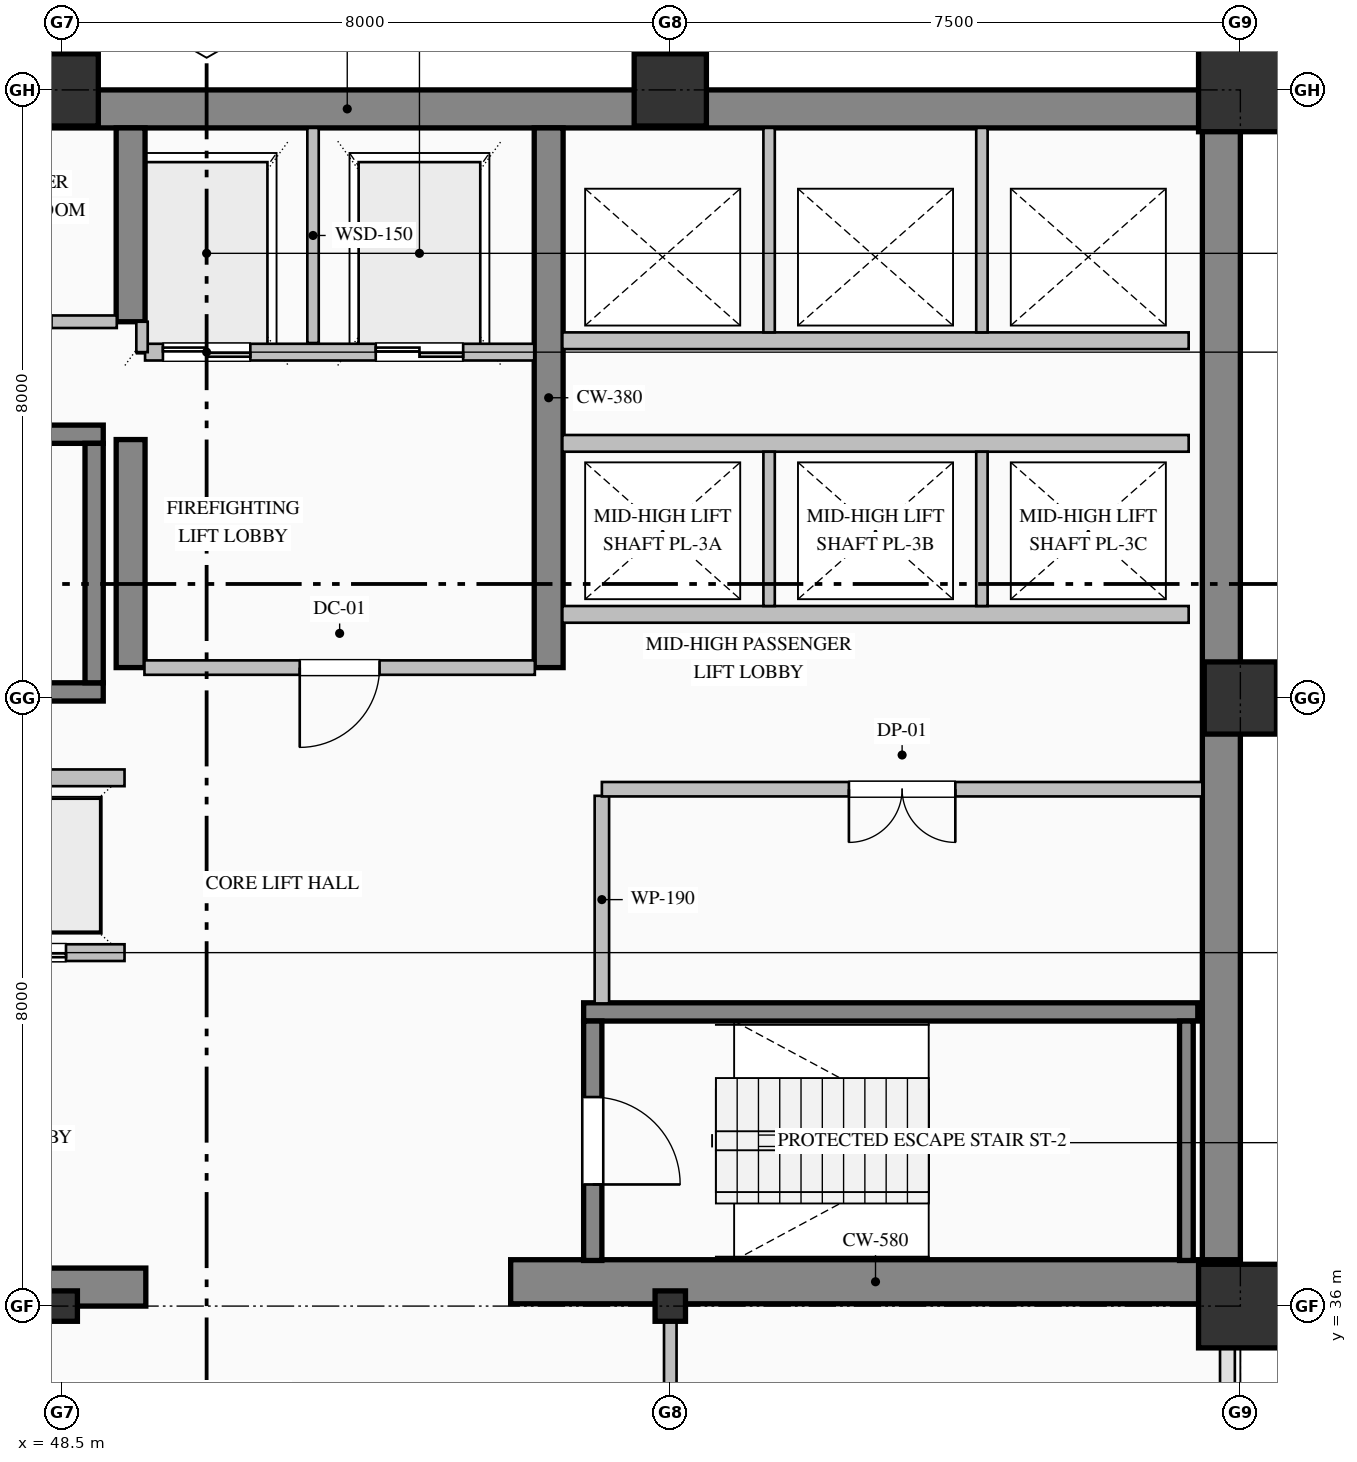
"""IFC4 building model, lengths in metres.
Left out: names, types, materials, properties, quantities, classifications, styles, units other than length and angle.
Written with IfcOpenShell. Run it as: python <this file> out.ifc"""

import sys

from ifc_helpers import new_model, si_unit, direction, frame, frame_2d, origin, origin_2d, place, context, subcontext, project, spatial, rectangle, hollow_rectangle, i_section, extrude, element, fill, save


model = new_model("IFC4")
c1 = context("Model", 3, precision=1e-05, world=origin(), true_north=direction((0.0, 1.0)))
c2 = subcontext(c1, "Body", "Model", "MODEL_VIEW")
j1 = project(units=[si_unit("LENGTHUNIT", "METRE"), si_unit("PLANEANGLEUNIT", "RADIAN")], contexts=[c1])
p1 = place(None, origin())
s1 = spatial("IfcSite", under=j1, at=p1, CompositionType="ELEMENT")
p2 = place(p1, origin())
s2 = spatial("IfcBuilding", under=s1, at=p2, CompositionType="ELEMENT")
p3 = place(p2, frame((0.0, 0.0, 123.0)))
s3 = spatial("IfcBuildingStorey", under=s2, at=p3, CompositionType="ELEMENT", Elevation=123.0)
p4 = place(p3, frame((40.5, 51.75, 0.0), z_axis=(0.0, 0.0, 1.0), x_axis=(1.0, 0.0, 0.0)))
e1 = element("IfcWall", 1, at=p4, inside=s3, PredefinedType="SHEAR", context=c2, shape_type="SweptSolid", body=[
    extrude(rectangle(XDim=23.5, YDim=0.5, at=frame_2d((11.75, 0.0))), origin(), (0.0, 0.0, 1.0), 3.765),
])
p5 = place(p3, frame((63.75, 36.32, 0.0), z_axis=(0.0, 0.0, 1.0), x_axis=(0.0, 1.0, 0.0)))
e2 = element("IfcWall", 2, at=p5, inside=s3, PredefinedType="SHEAR", context=c2, shape_type="SweptSolid", body=[
    extrude(rectangle(XDim=15.18, YDim=0.5, at=frame_2d((7.59, 0.0))), origin(), (0.0, 0.0, 1.0), 3.765),
])
p6 = place(p3, frame((40.5, 36.25, 0.0), z_axis=(0.0, 0.0, 1.0), x_axis=(1.0, 0.0, 0.0)))
e3 = element("IfcWall", 3, at=p6, inside=s3, PredefinedType="SHEAR", context=c2, shape_type="SweptSolid", body=[
    extrude(rectangle(XDim=9.1, YDim=0.5, at=frame_2d((4.55, 0.0))), origin(), (0.0, 0.0, 1.0), 3.765),
])
p7 = place(p3, frame((54.4, 36.32, 0.0), z_axis=(0.0, 0.0, 1.0), x_axis=(1.0, 0.0, 0.0)))
e4 = element("IfcWall", 4, at=p7, inside=s3, PredefinedType="SHEAR", context=c2, shape_type="SweptSolid", body=[
    extrude(rectangle(XDim=9.6, YDim=0.58, at=frame_2d((4.8, 0.0))), origin(), (0.0, 0.0, 1.0), 4.0),
])
p8 = place(p3, frame((49.4, 44.4, 0.0), z_axis=(0.0, 0.0, 1.0), x_axis=(0.0, 1.0, 0.0)))
e5 = element("IfcWall", 5, at=p8, inside=s3, PredefinedType="SHEAR", context=c2, shape_type="SweptSolid", body=[
    extrude(rectangle(XDim=3.0, YDim=0.38, at=frame_2d((1.5, 0.0))), origin(), (0.0, 0.0, 1.0), 3.765),
])
p9 = place(p3, frame((49.4, 48.95, 0.0), z_axis=(0.0, 0.0, 1.0), x_axis=(0.0, 1.0, 0.0)))
e6 = element("IfcWall", 6, at=p9, inside=s3, PredefinedType="SHEAR", context=c2, shape_type="SweptSolid", body=[
    extrude(rectangle(XDim=2.55, YDim=0.38, at=frame_2d((1.275, 0.0))), origin(), (0.0, 0.0, 1.0), 3.765),
])
p10 = place(p3, frame((54.9, 44.4, 0.0), z_axis=(0.0, 0.0, 1.0), x_axis=(0.0, 1.0, 0.0)))
e7 = element("IfcWall", 7, at=p10, inside=s3, PredefinedType="SHEAR", context=c2, shape_type="SweptSolid", body=[
    extrude(rectangle(XDim=7.1, YDim=0.38, at=frame_2d((3.55, 0.0))), origin(), (0.0, 0.0, 1.0), 3.765),
])
p11 = place(p3, frame((48.5, 36.0, 0.0), z_axis=(0.0, 0.0, 1.0), x_axis=(1.0, 0.0, 0.0)))
e8 = element("IfcColumn", 8, at=p11, inside=s3, PredefinedType="COLUMN", context=c2, shape_type="SweptSolid", body=[
    extrude(i_section(OverallWidth=0.4, OverallDepth=0.4, WebThickness=0.013, FlangeThickness=0.021, FilletRadius=0.022, at=origin_2d()), origin(), (0.0, 0.0, 1.0), 4.0),
])
p12 = place(p3, frame((48.5, 52.0, 0.0), z_axis=(0.0, 0.0, 1.0), x_axis=(1.0, 0.0, 0.0)))
e9 = element("IfcColumn", 9, at=p12, inside=s3, PredefinedType="COLUMN", context=c2, shape_type="SweptSolid", body=[
    extrude(hollow_rectangle(XDim=0.95, YDim=0.95, WallThickness=0.036, at=origin_2d()), origin(), (0.0, 0.0, 1.0), 4.0),
])
p13 = place(p3, frame((56.5, 36.0, 0.0), z_axis=(0.0, 0.0, 1.0), x_axis=(1.0, 0.0, 0.0)))
e10 = element("IfcColumn", 10, at=p13, inside=s3, PredefinedType="COLUMN", context=c2, shape_type="SweptSolid", body=[
    extrude(i_section(OverallWidth=0.4, OverallDepth=0.4, WebThickness=0.013, FlangeThickness=0.021, FilletRadius=0.022, at=origin_2d()), origin(), (0.0, 0.0, 1.0), 4.0),
])
p14 = place(p3, frame((56.5, 52.0, 0.0), z_axis=(0.0, 0.0, 1.0), x_axis=(1.0, 0.0, 0.0)))
e11 = element("IfcColumn", 11, at=p14, inside=s3, PredefinedType="COLUMN", context=c2, shape_type="SweptSolid", body=[
    extrude(hollow_rectangle(XDim=0.95, YDim=0.95, WallThickness=0.036, at=origin_2d()), origin(), (0.0, 0.0, 1.0), 4.0),
])
p15 = place(p3, frame((64.0, 36.0, 0.0), z_axis=(0.0, 0.0, 1.0), x_axis=(1.0, 0.0, 0.0)))
e12 = element("IfcColumn", 12, at=p15, inside=s3, PredefinedType="COLUMN", context=c2, shape_type="SweptSolid", body=[
    extrude(hollow_rectangle(XDim=1.1, YDim=1.1, WallThickness=0.04, at=origin_2d()), origin(), (0.0, 0.0, 1.0), 4.0),
])
p16 = place(p3, frame((64.0, 44.0, 0.0), z_axis=(0.0, 0.0, 1.0), x_axis=(1.0, 0.0, 0.0)))
e13 = element("IfcColumn", 13, at=p16, inside=s3, PredefinedType="COLUMN", context=c2, shape_type="SweptSolid", body=[
    extrude(hollow_rectangle(XDim=0.95, YDim=0.95, WallThickness=0.036, at=origin_2d()), origin(), (0.0, 0.0, 1.0), 4.0),
])
p17 = place(p3, frame((64.0, 52.0, 0.0), z_axis=(0.0, 0.0, 1.0), x_axis=(1.0, 0.0, 0.0)))
e14 = element("IfcColumn", 14, at=p17, inside=s3, PredefinedType="COLUMN", context=c2, shape_type="SweptSolid", body=[
    extrude(hollow_rectangle(XDim=1.1, YDim=1.1, WallThickness=0.04, at=origin_2d()), origin(), (0.0, 0.0, 1.0), 4.0),
])
for number, where, z_axis, x_axis in (
    (15, (40.96, 47.47, 0.0), (0.0, 0.0, 1.0), (1.0, 0.0, 0.0)),
    (16, (49.04, 44.08, 0.0), (0.0, 0.0, 1.0), (-1.0, 0.0, 0.0)),
):
    element("IfcWall", number, at=place(p3, frame(where, z_axis=z_axis, x_axis=x_axis)), inside=s3, PredefinedType="SOLIDWALL", context=c2, shape_type="SweptSolid", body=[
        extrude(rectangle(XDim=8.08, YDim=0.24, at=frame_2d((4.04, 0.0))), origin(), (0.0, 0.0, 1.0), 4.0),
    ])
p18 = place(p3, frame((48.92, 44.2, 0.0), z_axis=(0.0, 0.0, 1.0), x_axis=(0.0, 1.0, 0.0)))
e17 = element("IfcWall", 17, at=p18, inside=s3, PredefinedType="SOLIDWALL", context=c2, shape_type="SweptSolid", body=[
    extrude(rectangle(XDim=3.15, YDim=0.24, at=frame_2d((1.575, 0.0))), origin(), (0.0, 0.0, 1.0), 4.0),
])
p19 = place(p3, frame((55.36, 39.87, 0.0), z_axis=(0.0, 0.0, 1.0), x_axis=(1.0, 0.0, 0.0)))
e18 = element("IfcWall", 18, at=p19, inside=s3, PredefinedType="SOLIDWALL", context=c2, shape_type="SweptSolid", body=[
    extrude(rectangle(XDim=8.08, YDim=0.24, at=frame_2d((4.04, 0.0))), origin(), (0.0, 0.0, 1.0), 4.0),
])
p20 = place(p3, frame((55.48, 39.75, 0.0), z_axis=(0.0, 0.0, 1.0), x_axis=(0.0, -1.0, 0.0)))
e19 = element("IfcWall", 19, at=p20, inside=s3, PredefinedType="SOLIDWALL", context=c2, shape_type="SweptSolid", body=[
    extrude(rectangle(XDim=3.15, YDim=0.24, at=frame_2d((1.575, 0.0))), origin(), (0.0, 0.0, 1.0), 4.0),
])
p21 = place(p20, frame((1.0, 0.0, 0.0)))
e20 = element("IfcOpeningElement", 20, at=p21, cuts=e19, PredefinedType="OPENING", context=c2, shape_type="SweptSolid", body=[
    extrude(rectangle(XDim=1.15, YDim=2.2, at=frame_2d((0.575, 1.1))), frame((0.0, 0.13, 0.0), z_axis=(0.0, -1.0, 0.0), x_axis=(1.0, 0.0, 0.0)), (0.0, 0.0, 1.0), 0.26),
])
p22 = place(p3, frame((63.29, 36.6, 0.0), z_axis=(0.0, 0.0, 1.0), x_axis=(0.0, 1.0, 0.0)))
e21 = element("IfcWall", 21, at=p22, inside=s3, PredefinedType="SOLIDWALL", context=c2, shape_type="SweptSolid", body=[
    extrude(rectangle(XDim=3.15, YDim=0.18, at=frame_2d((1.575, 0.0))), origin(), (0.0, 0.0, 1.0), 4.0),
])
p23 = place(p3, frame((54.71, 48.55, 0.0), z_axis=(0.0, 0.0, 1.0), x_axis=(-1.0, 0.0, 0.0)))
e22 = element("IfcWall", 22, at=p23, inside=s3, PredefinedType="PARTITIONING", context=c2, shape_type="SweptSolid", body=[
    extrude(rectangle(XDim=5.12, YDim=0.22, at=frame_2d((2.56, 0.0))), origin(), (0.0, 0.0, 1.0), 3.765),
])
p24 = place(p23, frame((3.735, 0.0, 0.0)))
e23 = element("IfcOpeningElement", 23, at=p24, cuts=e22, PredefinedType="OPENING", context=c2, shape_type="SweptSolid", body=[
    extrude(rectangle(XDim=1.15, YDim=2.2, at=frame_2d((0.575, 1.1))), frame((0.0, 0.12, 0.0), z_axis=(0.0, -1.0, 0.0), x_axis=(1.0, 0.0, 0.0)), (0.0, 0.0, 1.0), 0.24),
])
p25 = place(p23, frame((0.935, 0.0, 0.0)))
e24 = element("IfcOpeningElement", 24, at=p25, cuts=e22, PredefinedType="OPENING", context=c2, shape_type="SweptSolid", body=[
    extrude(rectangle(XDim=1.15, YDim=2.2, at=frame_2d((0.575, 1.1))), frame((0.0, 0.12, 0.0), z_axis=(0.0, -1.0, 0.0), x_axis=(1.0, 0.0, 0.0)), (0.0, 0.0, 1.0), 0.24),
])
p26 = place(p3, frame((51.8, 48.67, 0.0), z_axis=(0.0, 0.0, 1.0), x_axis=(0.0, 1.0, 0.0)))
e25 = element("IfcWall", 25, at=p26, inside=s3, PredefinedType="PARTITIONING", context=c2, shape_type="SweptSolid", body=[
    extrude(rectangle(XDim=2.83, YDim=0.15, at=frame_2d((1.415, 0.0))), origin(), (0.0, 0.0, 1.0), 3.765),
])
p27 = place(p3, frame((49.55, 48.55, 0.0), z_axis=(0.0, 0.0, 1.0), x_axis=(0.0, 1.0, 0.0)))
e26 = element("IfcWall", 26, at=p27, inside=s3, PredefinedType="PARTITIONING", context=c2, shape_type="SweptSolid", body=[
    extrude(rectangle(XDim=0.4, YDim=0.15, at=frame_2d((0.2, 0.0))), origin(), (0.0, 0.0, 1.0), 3.765),
])
p28 = place(p3, frame((49.32, 40.65, 0.0), z_axis=(0.0, 0.0, 1.0), x_axis=(-1.0, 0.0, 0.0)))
e27 = element("IfcWall", 27, at=p28, inside=s3, PredefinedType="PARTITIONING", context=c2, shape_type="SweptSolid", body=[
    extrude(rectangle(XDim=8.24, YDim=0.22, at=frame_2d((4.12, 0.0))), origin(), (0.0, 0.0, 1.0), 3.765),
])
p29 = place(p28, frame((6.37, 0.0, 0.0)))
e28 = element("IfcOpeningElement", 28, at=p29, cuts=e27, PredefinedType="OPENING", context=c2, shape_type="SweptSolid", body=[
    extrude(rectangle(XDim=1.1, YDim=2.2, at=frame_2d((0.55, 1.1))), frame((0.0, 0.12, 0.0), z_axis=(0.0, -1.0, 0.0), x_axis=(1.0, 0.0, 0.0)), (0.0, 0.0, 1.0), 0.24),
])
p30 = place(p28, frame((3.57, 0.0, 0.0)))
e29 = element("IfcOpeningElement", 29, at=p30, cuts=e27, PredefinedType="OPENING", context=c2, shape_type="SweptSolid", body=[
    extrude(rectangle(XDim=1.1, YDim=2.2, at=frame_2d((0.55, 1.1))), frame((0.0, 0.12, 0.0), z_axis=(0.0, -1.0, 0.0), x_axis=(1.0, 0.0, 0.0)), (0.0, 0.0, 1.0), 0.24),
])
p31 = place(p28, frame((0.77, 0.0, 0.0)))
e30 = element("IfcOpeningElement", 30, at=p31, cuts=e27, PredefinedType="OPENING", context=c2, shape_type="SweptSolid", body=[
    extrude(rectangle(XDim=1.1, YDim=2.2, at=frame_2d((0.55, 1.1))), frame((0.0, 0.12, 0.0), z_axis=(0.0, -1.0, 0.0), x_axis=(1.0, 0.0, 0.0)), (0.0, 0.0, 1.0), 0.24),
])
for number, where, z_axis, x_axis in (
    (31, (41.08, 42.95, 0.0), (0.0, 0.0, 1.0), (1.0, 0.0, 0.0)),
    (32, (63.32, 45.1, 0.0), (0.0, 0.0, 1.0), (-1.0, 0.0, 0.0)),
    (33, (55.08, 47.35, 0.0), (0.0, 0.0, 1.0), (1.0, 0.0, 0.0)),
):
    element("IfcWall", number, at=place(p3, frame(where, z_axis=z_axis, x_axis=x_axis)), inside=s3, PredefinedType="PARTITIONING", context=c2, shape_type="SweptSolid", body=[
        extrude(rectangle(XDim=8.24, YDim=0.22, at=frame_2d((4.12, 0.0))), origin(), (0.0, 0.0, 1.0), 3.765),
    ])
for number, where, z_axis, x_axis in (
    (34, (57.8, 45.21, 0.0), (0.0, 0.0, 1.0), (0.0, 1.0, 0.0)),
    (35, (60.6, 45.21, 0.0), (0.0, 0.0, 1.0), (0.0, 1.0, 0.0)),
):
    element("IfcWall", number, at=place(p3, frame(where, z_axis=z_axis, x_axis=x_axis)), inside=s3, PredefinedType="PARTITIONING", context=c2, shape_type="SweptSolid", body=[
        extrude(rectangle(XDim=2.03, YDim=0.15, at=frame_2d((1.015, 0.0))), origin(), (0.0, 0.0, 1.0), 3.765),
    ])
p32 = place(p3, frame((63.32, 48.7, 0.0), z_axis=(0.0, 0.0, 1.0), x_axis=(-1.0, 0.0, 0.0)))
e36 = element("IfcWall", 36, at=p32, inside=s3, PredefinedType="PARTITIONING", context=c2, shape_type="SweptSolid", body=[
    extrude(rectangle(XDim=8.24, YDim=0.22, at=frame_2d((4.12, 0.0))), origin(), (0.0, 0.0, 1.0), 3.765),
])
for number, where, z_axis, x_axis in (
    (37, (57.8, 48.81, 0.0), (0.0, 0.0, 1.0), (0.0, 1.0, 0.0)),
    (38, (60.6, 48.81, 0.0), (0.0, 0.0, 1.0), (0.0, 1.0, 0.0)),
):
    element("IfcWall", number, at=place(p3, frame(where, z_axis=z_axis, x_axis=x_axis)), inside=s3, PredefinedType="PARTITIONING", context=c2, shape_type="SweptSolid", body=[
        extrude(rectangle(XDim=2.69, YDim=0.15, at=frame_2d((1.345, 0.0))), origin(), (0.0, 0.0, 1.0), 3.765),
    ])
p33 = place(p3, frame((46.6, 48.95, 0.0), z_axis=(0.0, 0.0, 1.0), x_axis=(1.0, 0.0, 0.0)))
e39 = element("IfcWall", 39, at=p33, inside=s3, PredefinedType="PARTITIONING", context=c2, shape_type="SweptSolid", body=[
    extrude(rectangle(XDim=2.618, YDim=0.165, at=frame_2d((1.309, 0.0))), origin(), (0.0, 0.0, 1.0), 3.765),
])
p34 = place(p33, frame((0.859, 0.0, 0.0)))
e40 = element("IfcOpeningElement", 40, at=p34, cuts=e39, PredefinedType="OPENING", context=c2, shape_type="SweptSolid", body=[
    extrude(rectangle(XDim=0.9, YDim=2.15, at=frame_2d((0.45, 1.075))), frame((0.0, 0.093, 0.0), z_axis=(0.0, -1.0, 0.0), x_axis=(1.0, 0.0, 0.0)), (0.0, 0.0, 1.0), 0.185),
])
p35 = place(p3, frame((54.718, 44.4, 0.0), z_axis=(0.0, 0.0, 1.0), x_axis=(-1.0, 0.0, 0.0)))
e41 = element("IfcWall", 41, at=p35, inside=s3, PredefinedType="PARTITIONING", context=c2, shape_type="SweptSolid", body=[
    extrude(rectangle(XDim=5.136, YDim=0.19, at=frame_2d((2.568, 0.0))), origin(), (0.0, 0.0, 1.0), 3.765),
])
p36 = place(p35, frame((2.043, 0.0, 0.0)))
e42 = element("IfcOpeningElement", 42, at=p36, cuts=e41, PredefinedType="OPENING", context=c2, shape_type="SweptSolid", body=[
    extrude(rectangle(XDim=1.05, YDim=2.15, at=frame_2d((0.525, 1.075))), frame((0.0, 0.105, 0.0), z_axis=(0.0, -1.0, 0.0), x_axis=(1.0, 0.0, 0.0)), (0.0, 0.0, 1.0), 0.21),
])
p37 = place(p3, frame((55.6, 42.713, 0.0), z_axis=(0.0, 0.0, 1.0), x_axis=(0.0, -1.0, 0.0)))
e43 = element("IfcWall", 43, at=p37, inside=s3, PredefinedType="PARTITIONING", context=c2, shape_type="SweptSolid", body=[
    extrude(rectangle(XDim=2.731, YDim=0.19, at=frame_2d((1.365, 0.0))), origin(), (0.0, 0.0, 1.0), 3.765),
])
p38 = place(p3, frame((63.5, 42.8, 0.0), z_axis=(0.0, 0.0, 1.0), x_axis=(-1.0, 0.0, 0.0)))
e44 = element("IfcWall", 44, at=p38, inside=s3, PredefinedType="PARTITIONING", context=c2, shape_type="SweptSolid", body=[
    extrude(rectangle(XDim=7.9, YDim=0.19, at=frame_2d((3.95, 0.0))), origin(), (0.0, 0.0, 1.0), 3.765),
])
p39 = place(p38, frame((3.25, 0.0, 0.0)))
e45 = element("IfcOpeningElement", 45, at=p39, cuts=e44, PredefinedType="OPENING", context=c2, shape_type="SweptSolid", body=[
    extrude(rectangle(XDim=1.4, YDim=2.25, at=frame_2d((0.7, 1.125))), frame((0.0, 0.105, 0.0), z_axis=(0.0, -1.0, 0.0), x_axis=(1.0, 0.0, 0.0)), (0.0, 0.0, 1.0), 0.21),
])
p40 = place(p3, frame((56.5, 36.0, 0.0), z_axis=(0.0, 0.0, 1.0), x_axis=(0.0, -1.0, 0.0)))
e46 = element("IfcWall", 46, at=p40, inside=s3, PredefinedType="PARTITIONING", context=c2, shape_type="SweptSolid", body=[
    extrude(rectangle(XDim=2.325, YDim=0.165, at=frame_2d((1.163, 0.0))), origin(), (0.0, 0.0, 1.0), 3.157),
])
p41 = place(p21, origin())
e47 = element("IfcDoor", 47, at=p41, inside=s3, OperationType="SINGLE_SWING_RIGHT", PredefinedType="DOOR", context=c2, shape_type="SweptSolid", body=[
    extrude(rectangle(XDim=1.15, YDim=2.2, at=frame_2d((0.575, 1.1))), frame((0.0, 0.025, 0.0), z_axis=(0.0, -1.0, 0.0), x_axis=(1.0, 0.0, 0.0)), (0.0, 0.0, 1.0), 0.05),
])
fill(e20, e47)
p42 = place(p24, origin())
e48 = element("IfcDoor", 48, at=p42, inside=s3, OperationType="DOUBLE_DOOR_SLIDING", PredefinedType="DOOR", context=c2, shape_type="SweptSolid", body=[
    extrude(rectangle(XDim=1.15, YDim=2.2, at=frame_2d((0.575, 1.1))), frame((0.0, 0.025, 0.0), z_axis=(0.0, -1.0, 0.0), x_axis=(1.0, 0.0, 0.0)), (0.0, 0.0, 1.0), 0.05),
])
fill(e23, e48)
p43 = place(p25, origin())
e49 = element("IfcDoor", 49, at=p43, inside=s3, OperationType="DOUBLE_DOOR_SLIDING", PredefinedType="DOOR", context=c2, shape_type="SweptSolid", body=[
    extrude(rectangle(XDim=1.15, YDim=2.2, at=frame_2d((0.575, 1.1))), frame((0.0, 0.025, 0.0), z_axis=(0.0, -1.0, 0.0), x_axis=(1.0, 0.0, 0.0)), (0.0, 0.0, 1.0), 0.05),
])
fill(e24, e49)
p44 = place(p31, origin())
e50 = element("IfcDoor", 50, at=p44, inside=s3, OperationType="DOUBLE_DOOR_SLIDING", PredefinedType="DOOR", context=c2, shape_type="SweptSolid", body=[
    extrude(rectangle(XDim=1.1, YDim=2.2, at=frame_2d((0.55, 1.1))), frame((0.0, 0.025, 0.0), z_axis=(0.0, -1.0, 0.0), x_axis=(1.0, 0.0, 0.0)), (0.0, 0.0, 1.0), 0.05),
])
fill(e30, e50)
p45 = place(p36, origin())
e51 = element("IfcDoor", 51, at=p45, inside=s3, OperationType="SINGLE_SWING_RIGHT", PredefinedType="DOOR", context=c2, shape_type="SweptSolid", body=[
    extrude(rectangle(XDim=1.05, YDim=2.15, at=frame_2d((0.525, 1.075))), frame((0.0, 0.025, 0.0), z_axis=(0.0, -1.0, 0.0), x_axis=(1.0, 0.0, 0.0)), (0.0, 0.0, 1.0), 0.05),
])
fill(e42, e51)
p46 = place(p39, origin())
e52 = element("IfcDoor", 52, at=p46, inside=s3, OperationType="DOUBLE_DOOR_SINGLE_SWING", PredefinedType="DOOR", context=c2, shape_type="SweptSolid", body=[
    extrude(rectangle(XDim=1.4, YDim=2.25, at=frame_2d((0.7, 1.125))), frame((0.0, 0.025, 0.0), z_axis=(0.0, -1.0, 0.0), x_axis=(1.0, 0.0, 0.0)), (0.0, 0.0, 1.0), 0.05),
])
fill(e45, e52)
save(model, sys.argv[1])
